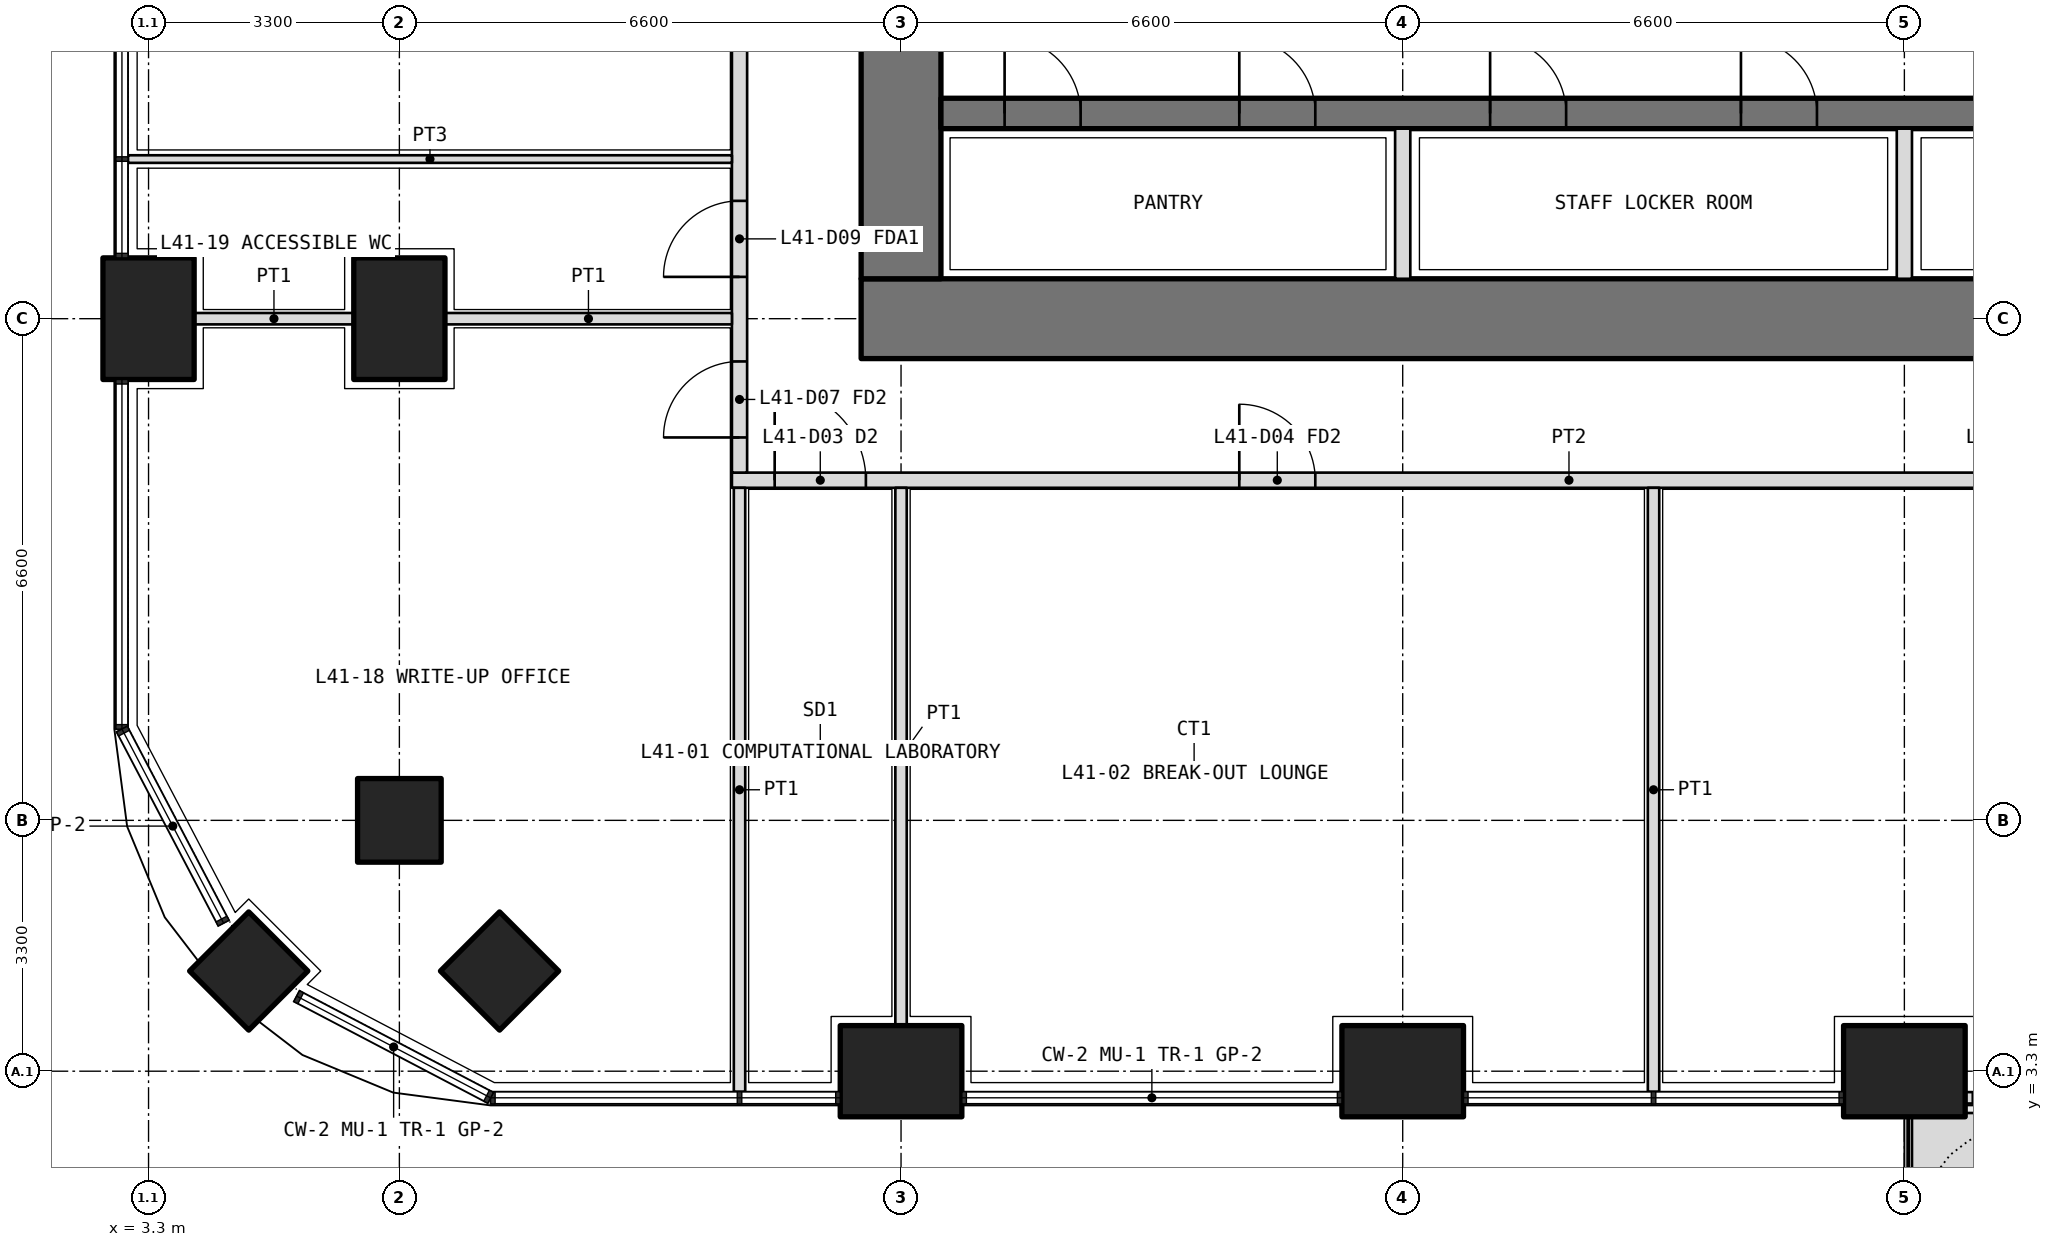
"""IFC4 building model, lengths in metres.
Left out: names, types, materials, properties, quantities, classifications, styles, units other than length and angle.
Written with IfcOpenShell. Run it as: python <this file> out.ifc"""

import sys

from ifc_helpers import new_model, si_unit, direction, frame, frame_2d, origin, origin_2d, place, context, subcontext, project, spatial, polyline, rectangle, outline, extrude, element, fill, save


model = new_model("IFC4")
c1 = context("Model", 3, precision=1e-05, world=origin(), true_north=direction((0.0, 1.0)))
c2 = subcontext(c1, "Body", "Model", "MODEL_VIEW")
j1 = project(units=[si_unit("LENGTHUNIT", "METRE"), si_unit("PLANEANGLEUNIT", "RADIAN")], contexts=[c1])
p1 = place(None, origin())
s1 = spatial("IfcSite", under=j1, at=p1, CompositionType="ELEMENT")
p2 = place(p1, origin())
s2 = spatial("IfcBuilding", under=s1, at=p2, CompositionType="ELEMENT")
p3 = place(p2, frame((0.0, 0.0, 180.9)))
s3 = spatial("IfcBuildingStorey", under=s2, at=p3, CompositionType="ELEMENT", Elevation=180.9)
p4 = place(p3, frame((4.618, 4.618, 0.0), z_axis=(0.0, 0.0, 1.0), x_axis=(0.707106781187, 0.707106781187, 0.0)))
e1 = element("IfcColumn", 1, at=p4, inside=s3, PredefinedType="COLUMN", context=c2, shape_type="SweptSolid", body=[
    extrude(rectangle(XDim=1.1, YDim=1.1, at=origin_2d()), origin(), (0.0, 0.0, 1.0), 4.2),
])
for number, where, z_axis, x_axis in (
    (2, (13.2, 3.3, 0.0), (0.0, 0.0, 1.0), (1.0, 0.0, 0.0)),
    (3, (19.8, 3.3, 0.0), (0.0, 0.0, 1.0), (1.0, 0.0, 0.0)),
    (4, (26.4, 3.3, 0.0), (0.0, 0.0, 1.0), (1.0, 0.0, 0.0)),
    (5, (3.3, 13.2, 0.0), (0.0, 0.0, 1.0), (0.0, 1.0, 0.0)),
):
    element("IfcColumn", number, at=place(p3, frame(where, z_axis=z_axis, x_axis=x_axis)), inside=s3, PredefinedType="COLUMN", context=c2, shape_type="SweptSolid", body=[
        extrude(rectangle(XDim=1.6, YDim=1.2, at=origin_2d()), origin(), (0.0, 0.0, 1.0), 4.2),
    ])
for number, where, z_axis, x_axis in (
    (6, (6.6, 6.6, 0.0), (0.0, 0.0, 1.0), (1.0, 0.0, 0.0)),
    (7, (7.918, 4.618, 0.0), (0.0, 0.0, 1.0), (0.707, 0.707, 0.0)),
):
    element("IfcColumn", number, at=place(p3, frame(where, z_axis=z_axis, x_axis=x_axis)), inside=s3, PredefinedType="COLUMN", context=c2, shape_type="SweptSolid", body=[
        extrude(rectangle(XDim=1.1, YDim=1.1, at=origin_2d()), origin(), (0.0, 0.0, 1.0), 4.2),
    ])
p5 = place(p3, frame((6.6, 13.2, 0.0), z_axis=(0.0, 0.0, 1.0), x_axis=(0.0, 1.0, 0.0)))
e8 = element("IfcColumn", 8, at=p5, inside=s3, PredefinedType="COLUMN", context=c2, shape_type="SweptSolid", body=[
    extrude(rectangle(XDim=1.6, YDim=1.2, at=origin_2d()), origin(), (0.0, 0.0, 1.0), 4.2),
])
p6 = place(p3, origin())
e9 = element("IfcWall", 9, at=p6, inside=s3, PredefinedType="USERDEFINED", context=c2, shape_type="SweptSolid", body=[
    extrude(outline(polyline([(26.5, 1.75), (28.95, 1.75), (28.95, 2.75), (26.5, 2.75), (26.5, 1.75)]), holes=[polyline([(26.65, 1.9), (28.8, 1.9), (28.8, 2.6), (26.65, 2.6), (26.65, 1.9)])]), origin(), (0.0, 0.0, 1.0), 1.05),
])
p7 = place(p3, frame((27.2, 2.95, 0.0), z_axis=(0.0, 0.0, 1.0), x_axis=(1.0, 0.0, 0.0)))
e10 = element("IfcWall", 10, at=p7, inside=s3, PredefinedType="SOLIDWALL", context=c2, shape_type="SweptSolid", body=[
    extrude(rectangle(XDim=5.0, YDim=0.15, at=frame_2d((2.5, 0.0))), origin(), (0.0, 0.0, 1.0), 2.7),
])
p8 = place(p7, frame((2.75, 0.0, 0.0)))
e11 = element("IfcOpeningElement", 11, at=p8, cuts=e10, PredefinedType="OPENING", context=c2, shape_type="SweptSolid", body=[
    extrude(rectangle(XDim=1.0, YDim=2.4, at=frame_2d((0.5, 1.2))), frame((0.0, 0.085, 0.0), z_axis=(0.0, -1.0, 0.0), x_axis=(1.0, 0.0, 0.0)), (0.0, 0.0, 1.0), 0.17),
])
p9 = place(p7, frame((0.1, 0.0, 0.1)))
e12 = element("IfcOpeningElement", 12, at=p9, cuts=e10, PredefinedType="OPENING", context=c2, shape_type="SweptSolid", body=[
    extrude(rectangle(XDim=2.15, YDim=2.3, at=frame_2d((1.075, 1.15))), frame((0.0, 0.085, 0.0), z_axis=(0.0, -1.0, 0.0), x_axis=(1.0, 0.0, 0.0)), (0.0, 0.0, 1.0), 0.17),
])
p10 = place(p7, frame((3.85, 0.0, 0.1)))
e13 = element("IfcOpeningElement", 13, at=p10, cuts=e10, PredefinedType="OPENING", context=c2, shape_type="SweptSolid", body=[
    extrude(rectangle(XDim=1.05, YDim=2.3, at=frame_2d((0.525, 1.15))), frame((0.0, 0.085, 0.0), z_axis=(0.0, -1.0, 0.0), x_axis=(1.0, 0.0, 0.0)), (0.0, 0.0, 1.0), 0.17),
])
p11 = place(p3, frame((12.675, 13.2, 0.0), z_axis=(0.0, 0.0, 1.0), x_axis=(1.0, 0.0, 0.0)))
e14 = element("IfcWall", 14, at=p11, inside=s3, PredefinedType="SHEAR", context=c2, shape_type="SweptSolid", body=[
    extrude(rectangle(XDim=27.45, YDim=1.05, at=frame_2d((13.725, 0.0))), origin(), (0.0, 0.0, 1.0), 4.2),
])
p12 = place(p3, frame((13.2, 32.475, 0.0), z_axis=(0.0, 0.0, 1.0), x_axis=(0.0, -1.0, 0.0)))
e15 = element("IfcWall", 15, at=p12, inside=s3, PredefinedType="SHEAR", context=c2, shape_type="SweptSolid", body=[
    extrude(rectangle(XDim=18.75, YDim=1.05, at=frame_2d((9.375, 0.0))), origin(), (0.0, 0.0, 1.0), 4.2),
])
p13 = place(p12, frame((14.125, 0.0, 0.0)))
e16 = element("IfcOpeningElement", 16, at=p13, cuts=e15, PredefinedType="OPENING", context=c2, shape_type="SweptSolid", body=[
    extrude(rectangle(XDim=1.6, YDim=2.1, at=frame_2d((0.8, 1.05))), frame((0.0, 0.535, 0.0), z_axis=(0.0, -1.0, 0.0), x_axis=(1.0, 0.0, 0.0)), (0.0, 0.0, 1.0), 1.07),
])
p14 = place(p12, frame((3.325, 0.0, 0.0)))
e17 = element("IfcOpeningElement", 17, at=p14, cuts=e15, PredefinedType="OPENING", context=c2, shape_type="SweptSolid", body=[
    extrude(rectangle(XDim=1.6, YDim=2.1, at=frame_2d((0.8, 1.05))), frame((0.0, 0.535, 0.0), z_axis=(0.0, -1.0, 0.0), x_axis=(1.0, 0.0, 0.0)), (0.0, 0.0, 1.0), 1.07),
])
p15 = place(p3, frame((13.725, 15.9, 0.0), z_axis=(0.0, 0.0, 1.0), x_axis=(1.0, 0.0, 0.0)))
e18 = element("IfcWall", 18, at=p15, inside=s3, PredefinedType="SHEAR", context=c2, shape_type="SweptSolid", body=[
    extrude(rectangle(XDim=25.35, YDim=0.4, at=frame_2d((12.675, 0.0))), origin(), (0.0, 0.0, 1.0), 4.2),
])
p16 = place(p15, frame((0.837, 0.0, 0.0)))
e19 = element("IfcOpeningElement", 19, at=p16, cuts=e18, PredefinedType="OPENING", context=c2, shape_type="SweptSolid", body=[
    extrude(rectangle(XDim=1.0, YDim=2.1, at=frame_2d((0.5, 1.05))), frame((0.0, 0.21, 0.0), z_axis=(0.0, -1.0, 0.0), x_axis=(1.0, 0.0, 0.0)), (0.0, 0.0, 1.0), 0.42),
])
p17 = place(p15, frame((3.925, 0.0, 0.0)))
e20 = element("IfcOpeningElement", 20, at=p17, cuts=e18, PredefinedType="OPENING", context=c2, shape_type="SweptSolid", body=[
    extrude(rectangle(XDim=1.0, YDim=2.1, at=frame_2d((0.5, 1.05))), frame((0.0, 0.21, 0.0), z_axis=(0.0, -1.0, 0.0), x_axis=(1.0, 0.0, 0.0)), (0.0, 0.0, 1.0), 0.42),
])
p18 = place(p15, frame((7.225, 0.0, 0.0)))
e21 = element("IfcOpeningElement", 21, at=p18, cuts=e18, PredefinedType="OPENING", context=c2, shape_type="SweptSolid", body=[
    extrude(rectangle(XDim=1.0, YDim=2.1, at=frame_2d((0.5, 1.05))), frame((0.0, 0.21, 0.0), z_axis=(0.0, -1.0, 0.0), x_axis=(1.0, 0.0, 0.0)), (0.0, 0.0, 1.0), 0.42),
])
p19 = place(p15, frame((10.525, 0.0, 0.0)))
e22 = element("IfcOpeningElement", 22, at=p19, cuts=e18, PredefinedType="OPENING", context=c2, shape_type="SweptSolid", body=[
    extrude(rectangle(XDim=1.0, YDim=2.1, at=frame_2d((0.5, 1.05))), frame((0.0, 0.21, 0.0), z_axis=(0.0, -1.0, 0.0), x_axis=(1.0, 0.0, 0.0)), (0.0, 0.0, 1.0), 0.42),
])
p20 = place(p15, frame((13.825, 0.0, 0.0)))
e23 = element("IfcOpeningElement", 23, at=p20, cuts=e18, PredefinedType="OPENING", context=c2, shape_type="SweptSolid", body=[
    extrude(rectangle(XDim=1.0, YDim=2.1, at=frame_2d((0.5, 1.05))), frame((0.0, 0.21, 0.0), z_axis=(0.0, -1.0, 0.0), x_axis=(1.0, 0.0, 0.0)), (0.0, 0.0, 1.0), 0.42),
])
p21 = place(p15, frame((17.125, 0.0, 0.0)))
e24 = element("IfcOpeningElement", 24, at=p21, cuts=e18, PredefinedType="OPENING", context=c2, shape_type="SweptSolid", body=[
    extrude(rectangle(XDim=1.0, YDim=2.1, at=frame_2d((0.5, 1.05))), frame((0.0, 0.21, 0.0), z_axis=(0.0, -1.0, 0.0), x_axis=(1.0, 0.0, 0.0)), (0.0, 0.0, 1.0), 0.42),
])
p22 = place(p15, frame((20.425, 0.0, 0.0)))
e25 = element("IfcOpeningElement", 25, at=p22, cuts=e18, PredefinedType="OPENING", context=c2, shape_type="SweptSolid", body=[
    extrude(rectangle(XDim=1.0, YDim=2.1, at=frame_2d((0.5, 1.05))), frame((0.0, 0.21, 0.0), z_axis=(0.0, -1.0, 0.0), x_axis=(1.0, 0.0, 0.0)), (0.0, 0.0, 1.0), 0.42),
])
p23 = place(p15, frame((23.512, 0.0, 0.0)))
e26 = element("IfcOpeningElement", 26, at=p23, cuts=e18, PredefinedType="OPENING", context=c2, shape_type="SweptSolid", body=[
    extrude(rectangle(XDim=1.0, YDim=2.1, at=frame_2d((0.5, 1.05))), frame((0.0, 0.21, 0.0), z_axis=(0.0, -1.0, 0.0), x_axis=(1.0, 0.0, 0.0)), (0.0, 0.0, 1.0), 0.42),
])
for number, where, z_axis, x_axis in (
    (27, (19.8, 13.725, 0.0), (0.0, 0.0, 1.0), (0.0, 1.0, 0.0)),
    (28, (26.4, 13.725, 0.0), (0.0, 0.0, 1.0), (0.0, 1.0, 0.0)),
):
    element("IfcWall", number, at=place(p3, frame(where, z_axis=z_axis, x_axis=x_axis)), inside=s3, PredefinedType="PARTITIONING", context=c2, shape_type="SweptSolid", body=[
        extrude(rectangle(XDim=1.975, YDim=0.2, at=frame_2d((0.987, 0.0))), origin(), (0.0, 0.0, 1.0), 4.2),
    ])
p24 = place(p3, frame((10.975, 11.075, 0.0), z_axis=(0.0, 0.0, 1.0), x_axis=(1.0, 0.0, 0.0)))
e29 = element("IfcWall", 29, at=p24, inside=s3, PredefinedType="PARTITIONING", context=c2, shape_type="SweptSolid", body=[
    extrude(rectangle(XDim=22.025, YDim=0.2, at=frame_2d((11.012, 0.0))), origin(), (0.0, 0.0, 1.0), 2.85),
])
p25 = place(p24, frame((0.562, 0.0, 0.0)))
e30 = element("IfcOpeningElement", 30, at=p25, cuts=e29, PredefinedType="OPENING", context=c2, shape_type="SweptSolid", body=[
    extrude(rectangle(XDim=1.2, YDim=2.1, at=frame_2d((0.6, 1.05))), frame((0.0, 0.11, 0.0), z_axis=(0.0, -1.0, 0.0), x_axis=(1.0, 0.0, 0.0)), (0.0, 0.0, 1.0), 0.22),
])
p26 = place(p24, frame((6.675, 0.0, 0.0)))
e31 = element("IfcOpeningElement", 31, at=p26, cuts=e29, PredefinedType="OPENING", context=c2, shape_type="SweptSolid", body=[
    extrude(rectangle(XDim=1.0, YDim=2.1, at=frame_2d((0.5, 1.05))), frame((0.0, 0.11, 0.0), z_axis=(0.0, -1.0, 0.0), x_axis=(1.0, 0.0, 0.0)), (0.0, 0.0, 1.0), 0.22),
])
p27 = place(p24, frame((16.575, 0.0, 0.0)))
e32 = element("IfcOpeningElement", 32, at=p27, cuts=e29, PredefinedType="OPENING", context=c2, shape_type="SweptSolid", body=[
    extrude(rectangle(XDim=1.0, YDim=2.1, at=frame_2d((0.5, 1.05))), frame((0.0, 0.11, 0.0), z_axis=(0.0, -1.0, 0.0), x_axis=(1.0, 0.0, 0.0)), (0.0, 0.0, 1.0), 0.22),
])
p28 = place(p3, frame((11.075, 11.175, 0.0), z_axis=(0.0, 0.0, 1.0), x_axis=(0.0, 1.0, 0.0)))
e33 = element("IfcWall", 33, at=p28, inside=s3, PredefinedType="PARTITIONING", context=c2, shape_type="SweptSolid", body=[
    extrude(rectangle(XDim=23.85, YDim=0.2, at=frame_2d((11.925, 0.0))), origin(), (0.0, 0.0, 1.0), 2.85),
])
p29 = place(p28, frame((0.462, 0.0, 0.0)))
e34 = element("IfcOpeningElement", 34, at=p29, cuts=e33, PredefinedType="OPENING", context=c2, shape_type="SweptSolid", body=[
    extrude(rectangle(XDim=1.0, YDim=2.1, at=frame_2d((0.5, 1.05))), frame((0.0, 0.11, 0.0), z_axis=(0.0, -1.0, 0.0), x_axis=(1.0, 0.0, 0.0)), (0.0, 0.0, 1.0), 0.22),
])
p30 = place(p28, frame((2.575, 0.0, 0.0)))
e35 = element("IfcOpeningElement", 35, at=p30, cuts=e33, PredefinedType="OPENING", context=c2, shape_type="SweptSolid", body=[
    extrude(rectangle(XDim=1.0, YDim=2.1, at=frame_2d((0.5, 1.05))), frame((0.0, 0.11, 0.0), z_axis=(0.0, -1.0, 0.0), x_axis=(1.0, 0.0, 0.0)), (0.0, 0.0, 1.0), 0.22),
])
p31 = place(p28, frame((5.625, 0.0, 0.0)))
e36 = element("IfcOpeningElement", 36, at=p31, cuts=e33, PredefinedType="OPENING", context=c2, shape_type="SweptSolid", body=[
    extrude(rectangle(XDim=0.9, YDim=2.1, at=frame_2d((0.45, 1.05))), frame((0.0, 0.11, 0.0), z_axis=(0.0, -1.0, 0.0), x_axis=(1.0, 0.0, 0.0)), (0.0, 0.0, 1.0), 0.22),
])
p32 = place(p28, frame((9.425, 0.0, 0.0)))
e37 = element("IfcOpeningElement", 37, at=p32, cuts=e33, PredefinedType="OPENING", context=c2, shape_type="SweptSolid", body=[
    extrude(rectangle(XDim=0.9, YDim=2.1, at=frame_2d((0.45, 1.05))), frame((0.0, 0.11, 0.0), z_axis=(0.0, -1.0, 0.0), x_axis=(1.0, 0.0, 0.0)), (0.0, 0.0, 1.0), 0.22),
])
p33 = place(p28, frame((12.975, 0.0, 0.0)))
e38 = element("IfcOpeningElement", 38, at=p33, cuts=e33, PredefinedType="OPENING", context=c2, shape_type="SweptSolid", body=[
    extrude(rectangle(XDim=1.0, YDim=2.1, at=frame_2d((0.5, 1.05))), frame((0.0, 0.11, 0.0), z_axis=(0.0, -1.0, 0.0), x_axis=(1.0, 0.0, 0.0)), (0.0, 0.0, 1.0), 0.22),
])
p34 = place(p28, frame((19.087, 0.0, 0.0)))
e39 = element("IfcOpeningElement", 39, at=p34, cuts=e33, PredefinedType="OPENING", context=c2, shape_type="SweptSolid", body=[
    extrude(rectangle(XDim=1.0, YDim=2.1, at=frame_2d((0.5, 1.05))), frame((0.0, 0.11, 0.0), z_axis=(0.0, -1.0, 0.0), x_axis=(1.0, 0.0, 0.0)), (0.0, 0.0, 1.0), 0.22),
])
p35 = place(p3, frame((11.075, 3.03, 0.0), z_axis=(0.0, 0.0, 1.0), x_axis=(0.0, 1.0, 0.0)))
e40 = element("IfcWall", 40, at=p35, inside=s3, PredefinedType="PARTITIONING", context=c2, shape_type="SweptSolid", body=[
    extrude(rectangle(XDim=7.945, YDim=0.15, at=frame_2d((3.973, 0.0))), origin(), (0.0, 0.0, 1.0), 2.7),
])
p36 = place(p3, frame((13.2, 3.9, 0.0), z_axis=(0.0, 0.0, 1.0), x_axis=(0.0, 1.0, 0.0)))
e41 = element("IfcWall", 41, at=p36, inside=s3, PredefinedType="PARTITIONING", context=c2, shape_type="SweptSolid", body=[
    extrude(rectangle(XDim=7.075, YDim=0.15, at=frame_2d((3.538, 0.0))), origin(), (0.0, 0.0, 1.0), 2.85),
])
p37 = place(p3, frame((23.1, 3.03, 0.0), z_axis=(0.0, 0.0, 1.0), x_axis=(0.0, 1.0, 0.0)))
e42 = element("IfcWall", 42, at=p37, inside=s3, PredefinedType="PARTITIONING", context=c2, shape_type="SweptSolid", body=[
    extrude(rectangle(XDim=7.945, YDim=0.15, at=frame_2d((3.973, 0.0))), origin(), (0.0, 0.0, 1.0), 2.7),
])
p38 = place(p3, frame((3.03, 15.3, 0.0), z_axis=(0.0, 0.0, 1.0), x_axis=(1.0, 0.0, 0.0)))
e43 = element("IfcWall", 43, at=p38, inside=s3, PredefinedType="PARTITIONING", context=c2, shape_type="SweptSolid", body=[
    extrude(rectangle(XDim=7.945, YDim=0.1, at=frame_2d((3.973, 0.0))), origin(), (0.0, 0.0, 1.0), 2.7),
])
p39 = place(p3, frame((3.9, 13.2, 0.0), z_axis=(0.0, 0.0, 1.0), x_axis=(1.0, 0.0, 0.0)))
e44 = element("IfcWall", 44, at=p39, inside=s3, PredefinedType="PARTITIONING", context=c2, shape_type="SweptSolid", body=[
    extrude(rectangle(XDim=2.1, YDim=0.15, at=frame_2d((1.05, 0.0))), origin(), (0.0, 0.0, 1.0), 2.85),
])
p40 = place(p3, frame((7.2, 13.2, 0.0), z_axis=(0.0, 0.0, 1.0), x_axis=(1.0, 0.0, 0.0)))
e45 = element("IfcWall", 45, at=p40, inside=s3, PredefinedType="PARTITIONING", context=c2, shape_type="SweptSolid", body=[
    extrude(rectangle(XDim=3.775, YDim=0.15, at=frame_2d((1.888, 0.0))), origin(), (0.0, 0.0, 1.0), 2.85),
])
p41 = place(p25, origin())
e46 = element("IfcDoor", 46, at=p41, inside=s3, OperationType="DOUBLE_DOOR_SINGLE_SWING", PredefinedType="DOOR", context=c2, shape_type="SweptSolid", body=[
    extrude(rectangle(XDim=1.2, YDim=2.1, at=frame_2d((0.6, 1.05))), frame((0.0, 0.025, 0.0), z_axis=(0.0, -1.0, 0.0), x_axis=(1.0, 0.0, 0.0)), (0.0, 0.0, 1.0), 0.05),
])
fill(e30, e46)
p42 = place(p26, origin())
e47 = element("IfcDoor", 47, at=p42, inside=s3, OperationType="SINGLE_SWING_LEFT", PredefinedType="DOOR", context=c2, shape_type="SweptSolid", body=[
    extrude(rectangle(XDim=1.0, YDim=2.1, at=frame_2d((0.5, 1.05))), frame((0.0, 0.025, 0.0), z_axis=(0.0, -1.0, 0.0), x_axis=(1.0, 0.0, 0.0)), (0.0, 0.0, 1.0), 0.05),
])
fill(e31, e47)
p43 = place(p29, origin())
e48 = element("IfcDoor", 48, at=p43, inside=s3, OperationType="SINGLE_SWING_LEFT", PredefinedType="DOOR", context=c2, shape_type="SweptSolid", body=[
    extrude(rectangle(XDim=1.0, YDim=2.1, at=frame_2d((0.5, 1.05))), frame((0.0, 0.025, 0.0), z_axis=(0.0, -1.0, 0.0), x_axis=(1.0, 0.0, 0.0)), (0.0, 0.0, 1.0), 0.05),
])
fill(e34, e48)
p44 = place(p30, origin())
e49 = element("IfcDoor", 49, at=p44, inside=s3, OperationType="SINGLE_SWING_LEFT", PredefinedType="DOOR", context=c2, shape_type="SweptSolid", body=[
    extrude(rectangle(XDim=1.0, YDim=2.1, at=frame_2d((0.5, 1.05))), frame((0.0, 0.025, 0.0), z_axis=(0.0, -1.0, 0.0), x_axis=(1.0, 0.0, 0.0)), (0.0, 0.0, 1.0), 0.05),
])
fill(e35, e49)
p45 = place(p16, origin())
e50 = element("IfcDoor", 50, at=p45, inside=s3, OperationType="SINGLE_SWING_LEFT", PredefinedType="DOOR", context=c2, shape_type="SweptSolid", body=[
    extrude(rectangle(XDim=1.0, YDim=2.1, at=frame_2d((0.5, 1.05))), frame((0.0, 0.025, 0.0), z_axis=(0.0, -1.0, 0.0), x_axis=(1.0, 0.0, 0.0)), (0.0, 0.0, 1.0), 0.05),
])
fill(e19, e50)
p46 = place(p17, origin())
e51 = element("IfcDoor", 51, at=p46, inside=s3, OperationType="SINGLE_SWING_LEFT", PredefinedType="DOOR", context=c2, shape_type="SweptSolid", body=[
    extrude(rectangle(XDim=1.0, YDim=2.1, at=frame_2d((0.5, 1.05))), frame((0.0, 0.025, 0.0), z_axis=(0.0, -1.0, 0.0), x_axis=(1.0, 0.0, 0.0)), (0.0, 0.0, 1.0), 0.05),
])
fill(e20, e51)
p47 = place(p18, origin())
e52 = element("IfcDoor", 52, at=p47, inside=s3, OperationType="SINGLE_SWING_LEFT", PredefinedType="DOOR", context=c2, shape_type="SweptSolid", body=[
    extrude(rectangle(XDim=1.0, YDim=2.1, at=frame_2d((0.5, 1.05))), frame((0.0, 0.025, 0.0), z_axis=(0.0, -1.0, 0.0), x_axis=(1.0, 0.0, 0.0)), (0.0, 0.0, 1.0), 0.05),
])
fill(e21, e52)
p48 = place(p19, origin())
e53 = element("IfcDoor", 53, at=p48, inside=s3, OperationType="SINGLE_SWING_LEFT", PredefinedType="DOOR", context=c2, shape_type="SweptSolid", body=[
    extrude(rectangle(XDim=1.0, YDim=2.1, at=frame_2d((0.5, 1.05))), frame((0.0, 0.025, 0.0), z_axis=(0.0, -1.0, 0.0), x_axis=(1.0, 0.0, 0.0)), (0.0, 0.0, 1.0), 0.05),
])
fill(e22, e53)
save(model, sys.argv[1])
